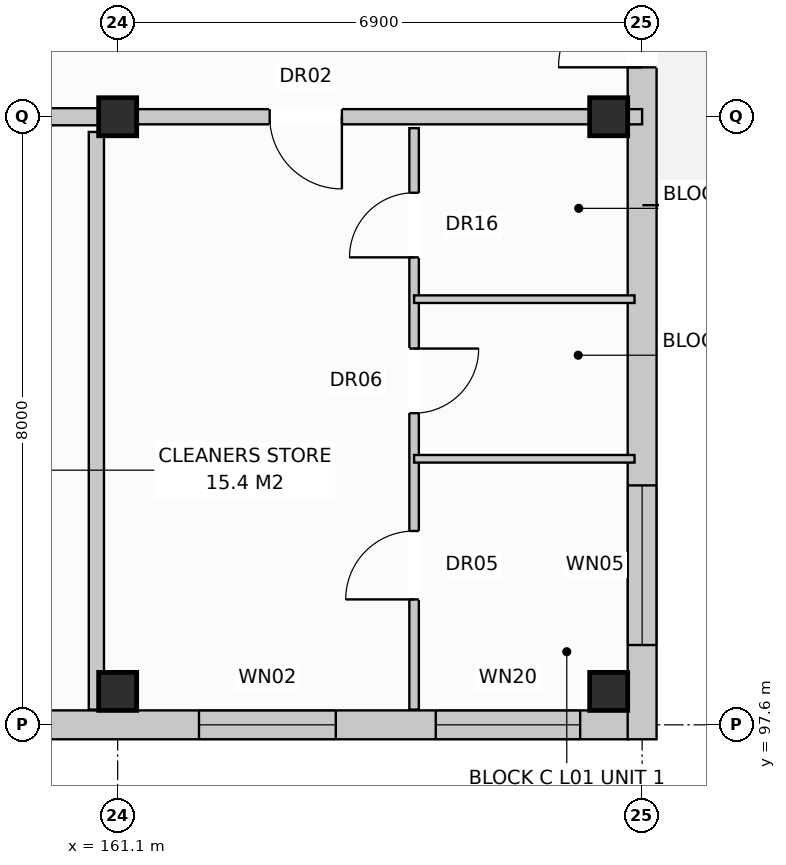
"""IFC4 building model, lengths in metres.
Left out: names, types, materials, properties, quantities, classifications, styles, units other than length and angle.
Written with IfcOpenShell. Run it as: python <this file> out.ifc"""

import sys

from ifc_helpers import new_model, si_unit, direction, frame, frame_2d, origin, origin_with_axes, origin_2d, place, context, subcontext, project, spatial, rectangle, extrude, element, fill, save


model = new_model("IFC4")
c1 = context("Model", 3, precision=1e-05, world=origin(), true_north=direction((0.0, 1.0)))
c2 = subcontext(c1, "Body", "Model", "MODEL_VIEW")
j1 = project(units=[si_unit("LENGTHUNIT", "METRE"), si_unit("PLANEANGLEUNIT", "RADIAN")], contexts=[c1])
p1 = place(None, origin())
s1 = spatial("IfcSite", under=j1, at=p1, CompositionType="ELEMENT")
p2 = place(p1, origin())
s2 = spatial("IfcBuilding", under=s1, at=p2, CompositionType="ELEMENT")
p3 = place(p2, frame((0.0, 0.0, 4.4)))
s3 = spatial("IfcBuildingStorey", under=s2, at=p3, CompositionType="ELEMENT", Elevation=4.4)
for number, where, z_axis, x_axis in (
    (1, (161.1, 98.04, 0.0), (0.0, 0.0, 1.0), (1.0, 0.0, 0.0)),
    (2, (161.1, 105.6, 0.0), (0.0, 0.0, 1.0), (1.0, 0.0, 0.0)),
    (3, (167.56, 98.04, 0.0), (0.0, 0.0, 1.0), (1.0, 0.0, 0.0)),
    (4, (167.56, 105.6, 0.0), (0.0, 0.0, 1.0), (1.0, 0.0, 0.0)),
):
    element("IfcColumn", number, at=place(p3, frame(where, z_axis=z_axis, x_axis=x_axis)), inside=s3, PredefinedType="COLUMN", context=c2, shape_type="SweptSolid", body=[
        extrude(rectangle(XDim=0.5, YDim=0.5, at=origin_2d()), origin(), (0.0, 0.0, 1.0), 3.6),
    ])
p4 = place(p3, frame((151.05, 97.6, 0.0), z_axis=(0.0, 0.0, 1.0), x_axis=(1.0, 0.0, 0.0)))
e5 = element("IfcWall", 5, at=p4, inside=s3, PredefinedType="STANDARD", context=c2, shape_type="SweptSolid", body=[
    extrude(rectangle(XDim=16.77, YDim=0.38, at=frame_2d((8.385, 0.0))), origin(), (0.0, 0.0, 1.0), 3.33),
])
p5 = place(p4, frame((11.12, 0.0, 0.8)))
e6 = element("IfcOpeningElement", 6, at=p5, cuts=e5, PredefinedType="OPENING", context=c2, shape_type="SweptSolid", body=[
    extrude(rectangle(XDim=1.8, YDim=1.7, at=frame_2d((0.9, 0.85))), frame((0.0, 0.202, 0.0), z_axis=(0.0, -1.0, 0.0), x_axis=(1.0, 0.0, 0.0)), (0.0, 0.0, 1.0), 0.404),
])
p6 = place(p4, frame((14.235, 0.0, 0.8)))
e7 = element("IfcOpeningElement", 7, at=p6, cuts=e5, PredefinedType="OPENING", context=c2, shape_type="SweptSolid", body=[
    extrude(rectangle(XDim=1.9, YDim=1.85, at=frame_2d((0.95, 0.925))), frame((0.0, 0.202, 0.0), z_axis=(0.0, -1.0, 0.0), x_axis=(1.0, 0.0, 0.0)), (0.0, 0.0, 1.0), 0.404),
])
p7 = place(p3, frame((168.0, 97.41, 0.0), z_axis=(0.0, 0.0, 1.0), x_axis=(0.0, 1.0, 0.0)))
e8 = element("IfcWall", 8, at=p7, inside=s3, PredefinedType="STANDARD", context=c2, shape_type="SweptSolid", body=[
    extrude(rectangle(XDim=18.78, YDim=0.38, at=frame_2d((9.39, 0.0))), origin(), (0.0, 0.0, 1.0), 3.33),
])
p8 = place(p7, frame((8.84, 0.0, 0.0)))
e9 = element("IfcOpeningElement", 9, at=p8, cuts=e8, PredefinedType="OPENING", context=c2, shape_type="SweptSolid", body=[
    extrude(rectangle(XDim=1.1, YDim=2.1, at=frame_2d((0.55, 1.05))), frame((0.0, 0.202, 0.0), z_axis=(0.0, -1.0, 0.0), x_axis=(1.0, 0.0, 0.0)), (0.0, 0.0, 1.0), 0.404),
])
p9 = place(p7, frame((1.24, 0.0, 0.72)))
e10 = element("IfcOpeningElement", 10, at=p9, cuts=e8, PredefinedType="OPENING", context=c2, shape_type="SweptSolid", body=[
    extrude(rectangle(XDim=2.1, YDim=1.9, at=frame_2d((1.05, 0.95))), frame((0.0, 0.202, 0.0), z_axis=(0.0, -1.0, 0.0), x_axis=(1.0, 0.0, 0.0)), (0.0, 0.0, 1.0), 0.404),
])
p10 = place(p7, frame((15.44, 0.0, 0.72)))
e11 = element("IfcOpeningElement", 11, at=p10, cuts=e8, PredefinedType="OPENING", context=c2, shape_type="SweptSolid", body=[
    extrude(rectangle(XDim=2.1, YDim=1.9, at=frame_2d((1.05, 0.95))), frame((0.0, 0.202, 0.0), z_axis=(0.0, -1.0, 0.0), x_axis=(1.0, 0.0, 0.0)), (0.0, 0.0, 1.0), 0.404),
])
p11 = place(p3, frame((160.82, 97.8, 0.0), z_axis=(0.0, 0.0, 1.0), x_axis=(0.0, 1.0, 0.0)))
e12 = element("IfcWall", 12, at=p11, inside=s3, PredefinedType="PARTITIONING", context=c2, shape_type="SweptSolid", body=[
    extrude(rectangle(XDim=7.6, YDim=0.2, at=frame_2d((3.8, 0.0))), origin(), (0.0, 0.0, 1.0), 2.77),
])
p12 = place(p3, frame((151.2, 105.6, 0.0), z_axis=(0.0, 0.0, 1.0), x_axis=(1.0, 0.0, 0.0)))
e13 = element("IfcWall", 13, at=p12, inside=s3, PredefinedType="PARTITIONING", context=c2, shape_type="SweptSolid", body=[
    extrude(rectangle(XDim=9.9, YDim=0.225, at=frame_2d((4.95, 0.0))), origin(), (0.0, 0.0, 1.0), 2.77),
])
p13 = place(p12, frame((0.475, 0.0, 0.0)))
e14 = element("IfcOpeningElement", 14, at=p13, cuts=e13, PredefinedType="OPENING", context=c2, shape_type="SweptSolid", body=[
    extrude(rectangle(XDim=1.1, YDim=2.15, at=frame_2d((0.55, 1.075))), frame((0.0, 0.125, 0.0), z_axis=(0.0, -1.0, 0.0), x_axis=(1.0, 0.0, 0.0)), (0.0, 0.0, 1.0), 0.249),
])
p14 = place(p12, frame((5.75, 0.0, 0.0)))
e15 = element("IfcOpeningElement", 15, at=p14, cuts=e13, PredefinedType="OPENING", context=c2, shape_type="SweptSolid", body=[
    extrude(rectangle(XDim=0.9, YDim=2.1, at=frame_2d((0.45, 1.05))), frame((0.0, 0.125, 0.0), z_axis=(0.0, -1.0, 0.0), x_axis=(1.0, 0.0, 0.0)), (0.0, 0.0, 1.0), 0.249),
])
p15 = place(p12, frame((7.8, 0.0, 0.0)))
e16 = element("IfcOpeningElement", 16, at=p15, cuts=e13, PredefinedType="OPENING", context=c2, shape_type="SweptSolid", body=[
    extrude(rectangle(XDim=0.95, YDim=2.15, at=frame_2d((0.475, 1.075))), frame((0.0, 0.125, 0.0), z_axis=(0.0, -1.0, 0.0), x_axis=(1.0, 0.0, 0.0)), (0.0, 0.0, 1.0), 0.249),
])
p16 = place(p3, frame((161.1, 105.6, 0.0), z_axis=(0.0, 0.0, 1.0), x_axis=(1.0, 0.0, 0.0)))
e17 = element("IfcWall", 17, at=p16, inside=s3, PredefinedType="PARTITIONING", context=c2, shape_type="SweptSolid", body=[
    extrude(rectangle(XDim=6.9, YDim=0.2, at=frame_2d((3.45, 0.0))), origin(), (0.0, 0.0, 1.0), 2.77),
])
p17 = place(p16, frame((2.0, 0.0, 0.0)))
e18 = element("IfcOpeningElement", 18, at=p17, cuts=e17, PredefinedType="OPENING", context=c2, shape_type="SweptSolid", body=[
    extrude(rectangle(XDim=0.95, YDim=2.15, at=frame_2d((0.475, 1.075))), frame((0.0, 0.112, 0.0), z_axis=(0.0, -1.0, 0.0), x_axis=(1.0, 0.0, 0.0)), (0.0, 0.0, 1.0), 0.224),
])
p18 = place(p3, frame((165.0, 105.45, 0.0), z_axis=(0.0, 0.0, 1.0), x_axis=(0.0, -1.0, 0.0)))
e19 = element("IfcWall", 19, at=p18, inside=s3, PredefinedType="PARTITIONING", context=c2, shape_type="SweptSolid", body=[
    extrude(rectangle(XDim=7.65, YDim=0.125, at=frame_2d((3.825, 0.0))), origin(), (0.0, 0.0, 1.0), 2.99),
])
p19 = place(p18, frame((0.85, 0.0, 0.0)))
e20 = element("IfcOpeningElement", 20, at=p19, cuts=e19, PredefinedType="OPENING", context=c2, shape_type="SweptSolid", body=[
    extrude(rectangle(XDim=0.85, YDim=2.1, at=frame_2d((0.425, 1.05))), frame((0.0, 0.074, 0.0), z_axis=(0.0, -1.0, 0.0), x_axis=(1.0, 0.0, 0.0)), (0.0, 0.0, 1.0), 0.149),
])
p20 = place(p18, frame((2.9, 0.0, 0.0)))
e21 = element("IfcOpeningElement", 21, at=p20, cuts=e19, PredefinedType="OPENING", context=c2, shape_type="SweptSolid", body=[
    extrude(rectangle(XDim=0.85, YDim=2.05, at=frame_2d((0.425, 1.025))), frame((0.0, 0.074, 0.0), z_axis=(0.0, -1.0, 0.0), x_axis=(1.0, 0.0, 0.0)), (0.0, 0.0, 1.0), 0.149),
])
p21 = place(p18, frame((5.3, 0.0, 0.0)))
e22 = element("IfcOpeningElement", 22, at=p21, cuts=e19, PredefinedType="OPENING", context=c2, shape_type="SweptSolid", body=[
    extrude(rectangle(XDim=0.9, YDim=2.1, at=frame_2d((0.45, 1.05))), frame((0.0, 0.074, 0.0), z_axis=(0.0, -1.0, 0.0), x_axis=(1.0, 0.0, 0.0)), (0.0, 0.0, 1.0), 0.149),
])
for number, where, z_axis, x_axis in (
    (23, (165.0, 103.2, 0.0), (0.0, 0.0, 1.0), (1.0, 0.0, 0.0)),
    (24, (165.0, 101.1, 0.0), (0.0, 0.0, 1.0), (1.0, 0.0, 0.0)),
):
    element("IfcWall", number, at=place(p3, frame(where, z_axis=z_axis, x_axis=x_axis)), inside=s3, PredefinedType="PARTITIONING", context=c2, shape_type="SweptSolid", body=[
        extrude(rectangle(XDim=2.9, YDim=0.1, at=frame_2d((1.45, 0.0))), origin(), (0.0, 0.0, 1.0), 3.33),
    ])
p22 = place(p5, origin_with_axes())
e25 = element("IfcWindow", 25, at=p22, inside=s3, PartitioningType="SINGLE_PANEL", PredefinedType="WINDOW", context=c2, shape_type="SweptSolid", body=[
    extrude(rectangle(XDim=1.8, YDim=1.7, at=frame_2d((0.9, 0.85))), frame((0.0, 0.03, 0.0), z_axis=(0.0, -1.0, 0.0), x_axis=(1.0, 0.0, 0.0)), (0.0, 0.0, 1.0), 0.06),
])
fill(e6, e25)
p23 = place(p6, origin_with_axes())
e26 = element("IfcWindow", 26, at=p23, inside=s3, PartitioningType="SINGLE_PANEL", PredefinedType="WINDOW", context=c2, shape_type="SweptSolid", body=[
    extrude(rectangle(XDim=1.9, YDim=1.85, at=frame_2d((0.95, 0.925))), frame((0.0, 0.03, 0.0), z_axis=(0.0, -1.0, 0.0), x_axis=(1.0, 0.0, 0.0)), (0.0, 0.0, 1.0), 0.06),
])
fill(e7, e26)
p24 = place(p8, origin_with_axes())
e27 = element("IfcDoor", 27, at=p24, inside=s3, OperationType="SINGLE_SWING_LEFT", PredefinedType="DOOR", context=c2, shape_type="SweptSolid", body=[
    extrude(rectangle(XDim=1.1, YDim=2.1, at=frame_2d((0.55, 1.05))), frame((0.0, 0.025, 0.0), z_axis=(0.0, -1.0, 0.0), x_axis=(1.0, 0.0, 0.0)), (0.0, 0.0, 1.0), 0.05),
])
fill(e9, e27)
p25 = place(p9, origin_with_axes())
e28 = element("IfcWindow", 28, at=p25, inside=s3, PartitioningType="SINGLE_PANEL", PredefinedType="WINDOW", context=c2, shape_type="SweptSolid", body=[
    extrude(rectangle(XDim=2.1, YDim=1.9, at=frame_2d((1.05, 0.95))), frame((0.0, 0.03, 0.0), z_axis=(0.0, -1.0, 0.0), x_axis=(1.0, 0.0, 0.0)), (0.0, 0.0, 1.0), 0.06),
])
fill(e10, e28)
p26 = place(p17, frame((0.95, 0.0, 0.0), z_axis=(0.0, 0.0, 1.0), x_axis=(-1.0, 0.0, 0.0)))
e29 = element("IfcDoor", 29, at=p26, inside=s3, OperationType="SINGLE_SWING_RIGHT", PredefinedType="DOOR", context=c2, shape_type="SweptSolid", body=[
    extrude(rectangle(XDim=0.95, YDim=2.15, at=frame_2d((0.475, 1.075))), frame((0.0, 0.025, 0.0), z_axis=(0.0, -1.0, 0.0), x_axis=(1.0, 0.0, 0.0)), (0.0, 0.0, 1.0), 0.05),
])
fill(e18, e29)
p27 = place(p19, frame((0.85, 0.0, 0.0), z_axis=(0.0, 0.0, 1.0), x_axis=(-1.0, 0.0, 0.0)))
e30 = element("IfcDoor", 30, at=p27, inside=s3, OperationType="SINGLE_SWING_RIGHT", PredefinedType="DOOR", context=c2, shape_type="SweptSolid", body=[
    extrude(rectangle(XDim=0.85, YDim=2.1, at=frame_2d((0.425, 1.05))), frame((0.0, 0.025, 0.0), z_axis=(0.0, -1.0, 0.0), x_axis=(1.0, 0.0, 0.0)), (0.0, 0.0, 1.0), 0.05),
])
fill(e20, e30)
p28 = place(p20, origin_with_axes())
e31 = element("IfcDoor", 31, at=p28, inside=s3, OperationType="SINGLE_SWING_LEFT", PredefinedType="DOOR", context=c2, shape_type="SweptSolid", body=[
    extrude(rectangle(XDim=0.85, YDim=2.05, at=frame_2d((0.425, 1.025))), frame((0.0, 0.025, 0.0), z_axis=(0.0, -1.0, 0.0), x_axis=(1.0, 0.0, 0.0)), (0.0, 0.0, 1.0), 0.05),
])
fill(e21, e31)
p29 = place(p21, frame((0.9, 0.0, 0.0), z_axis=(0.0, 0.0, 1.0), x_axis=(-1.0, 0.0, 0.0)))
e32 = element("IfcDoor", 32, at=p29, inside=s3, OperationType="SINGLE_SWING_RIGHT", PredefinedType="DOOR", context=c2, shape_type="SweptSolid", body=[
    extrude(rectangle(XDim=0.9, YDim=2.1, at=frame_2d((0.45, 1.05))), frame((0.0, 0.025, 0.0), z_axis=(0.0, -1.0, 0.0), x_axis=(1.0, 0.0, 0.0)), (0.0, 0.0, 1.0), 0.05),
])
fill(e22, e32)
save(model, sys.argv[1])
